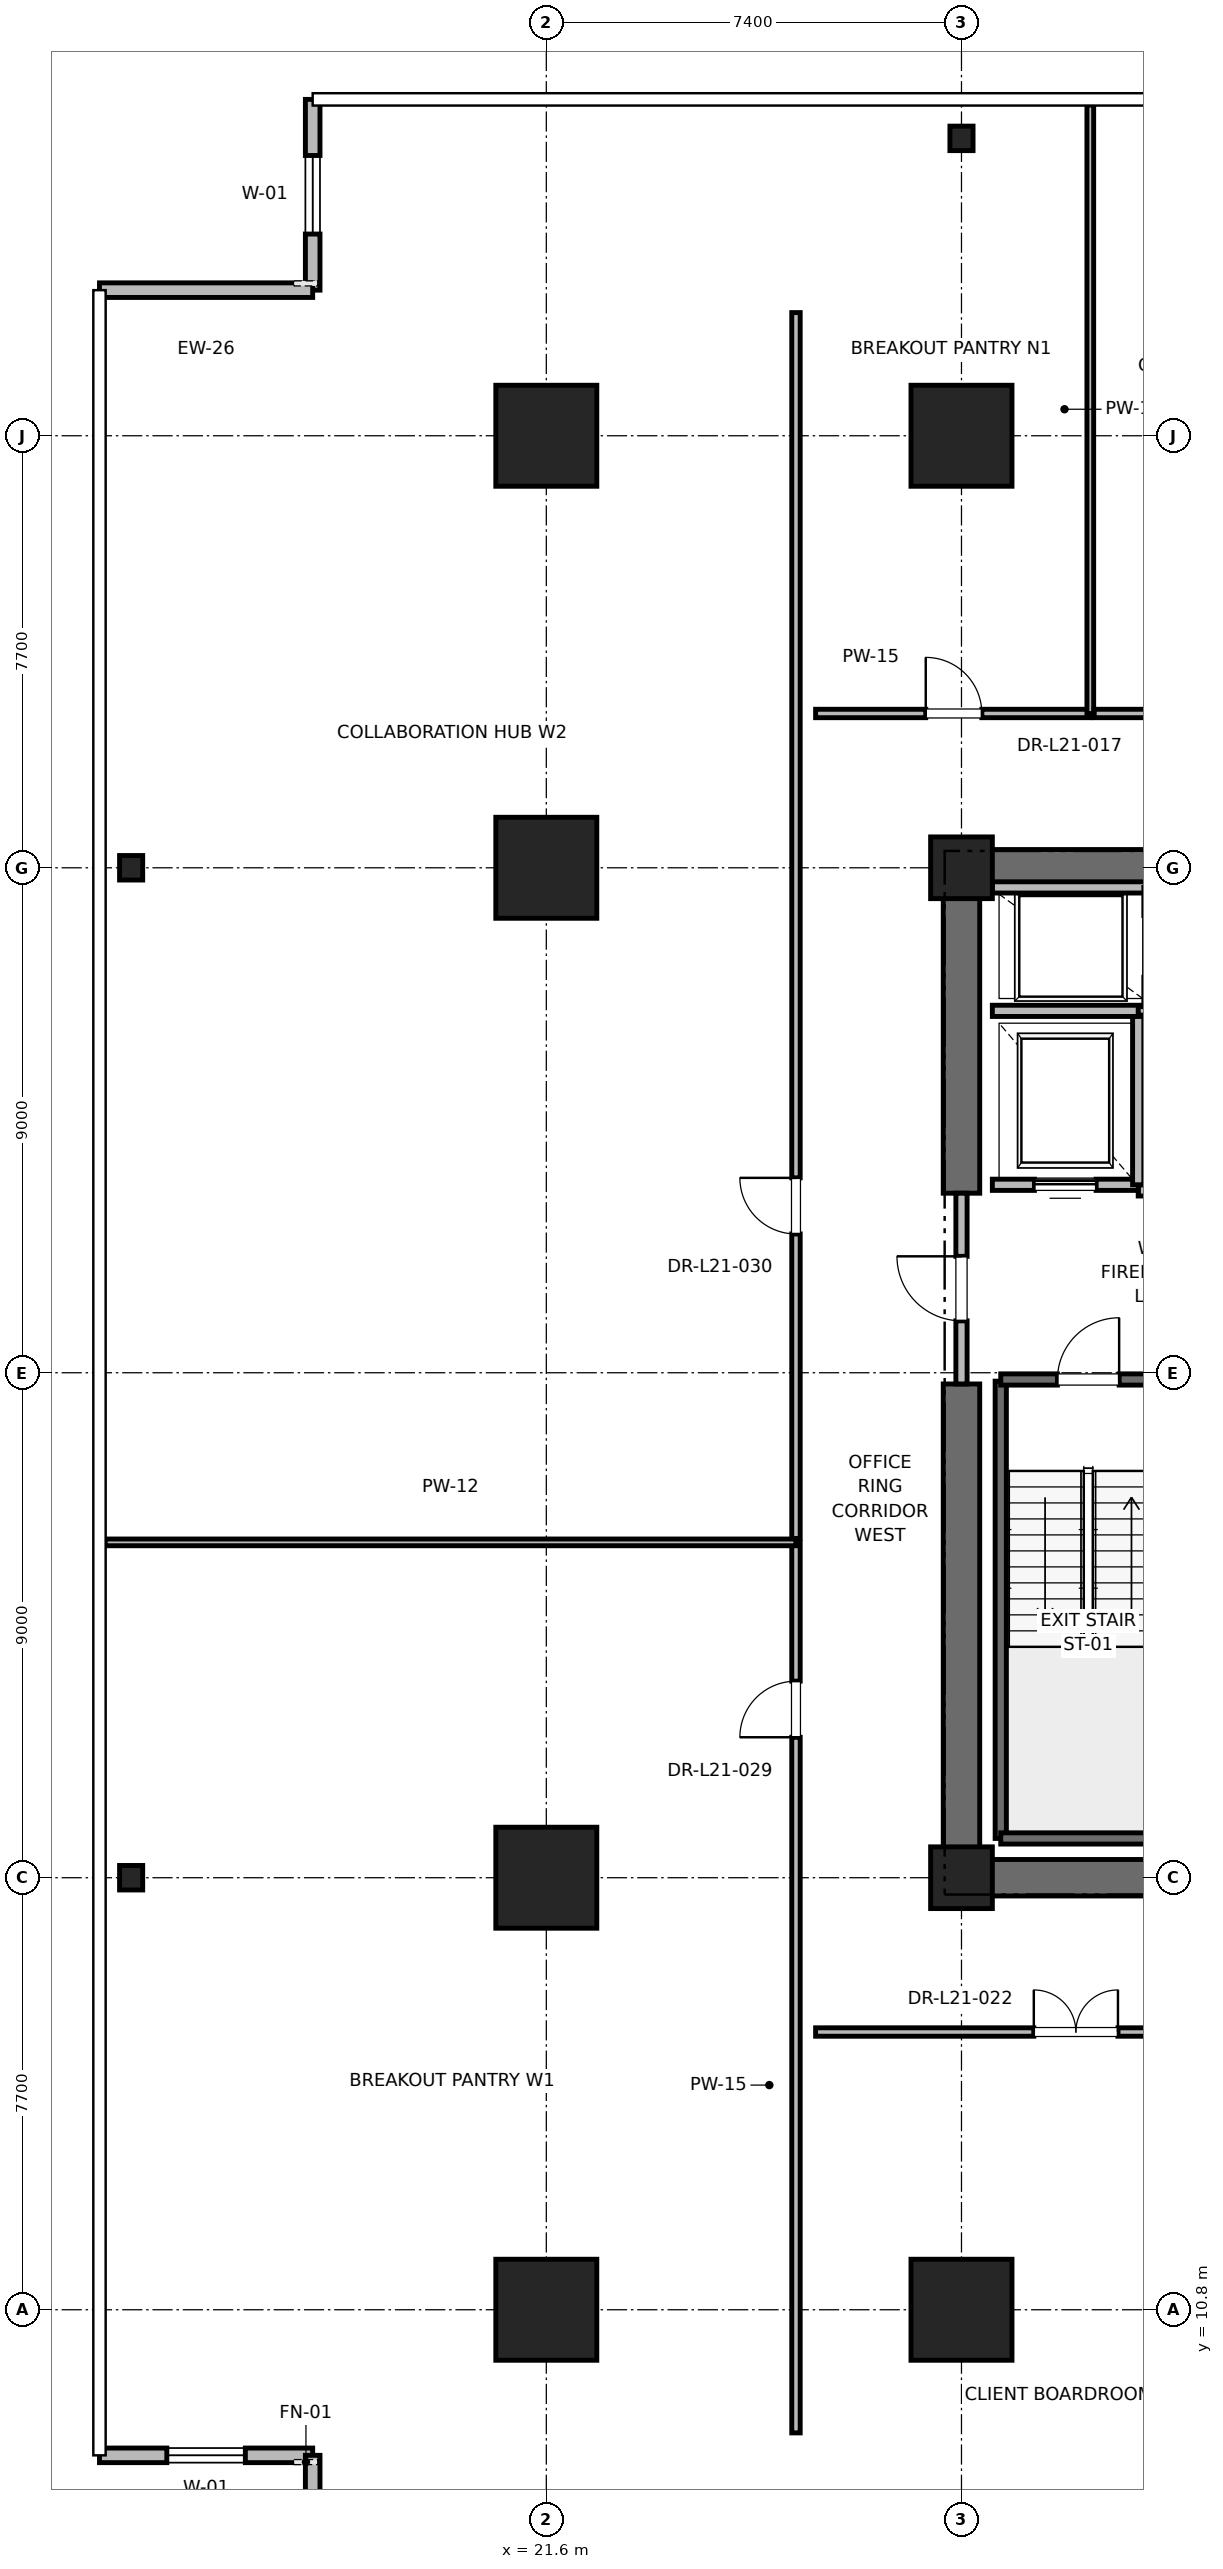
"""IFC4 building model, lengths in metres.
Left out: names, types, materials, properties, quantities, classifications, styles, units other than length and angle.
Written with IfcOpenShell. Run it as: python <this file> out.ifc"""

import sys

from ifc_helpers import new_model, si_unit, direction, frame, frame_2d, origin, origin_2d, place, context, subcontext, project, spatial, rectangle, i_section, extrude, element, fill, save


model = new_model("IFC4")
c1 = context("Model", 3, precision=1e-05, world=origin(), true_north=direction((0.0, 1.0)))
c2 = subcontext(c1, "Body", "Model", "MODEL_VIEW")
j1 = project(units=[si_unit("LENGTHUNIT", "METRE"), si_unit("PLANEANGLEUNIT", "RADIAN")], contexts=[c1])
p1 = place(None, origin())
s1 = spatial("IfcSite", under=j1, at=p1, CompositionType="ELEMENT")
p2 = place(p1, origin())
s2 = spatial("IfcBuilding", under=s1, at=p2, CompositionType="ELEMENT")
p3 = place(p2, frame((0.0, 0.0, 91.6)))
s3 = spatial("IfcBuildingStorey", under=s2, at=p3, CompositionType="ELEMENT", Elevation=91.6)
for number, where, z_axis, x_axis in (
    (1, (29.0, 10.8, 0.0), (0.0, 0.0, 1.0), (1.0, 0.0, 0.0)),
    (2, (29.0, 44.2, 0.0), (0.0, 0.0, 1.0), (1.0, 0.0, 0.0)),
    (3, (21.6, 18.5, 0.0), (0.0, 0.0, 1.0), (1.0, 0.0, 0.0)),
    (4, (21.6, 36.5, 0.0), (0.0, 0.0, 1.0), (1.0, 0.0, 0.0)),
    (5, (21.6, 10.8, 0.0), (0.0, 0.0, 1.0), (1.0, 0.0, 0.0)),
    (6, (21.6, 44.2, 0.0), (0.0, 0.0, 1.0), (1.0, 0.0, 0.0)),
):
    element("IfcColumn", number, at=place(p3, frame(where, z_axis=z_axis, x_axis=x_axis)), inside=s3, PredefinedType="COLUMN", context=c2, shape_type="SweptSolid", body=[
        extrude(rectangle(XDim=1.8, YDim=1.8, at=origin_2d()), origin(), (0.0, 0.0, 1.0), 4.0),
    ])
for number, where, z_axis, x_axis in (
    (7, (14.2, 18.5, 0.0), (0.0, 0.0, 1.0), (1.0, 0.0, 0.0)),
    (8, (14.2, 36.5, 0.0), (0.0, 0.0, 1.0), (1.0, 0.0, 0.0)),
    (9, (29.0, 49.5, 0.0), (0.0, 0.0, 1.0), (1.0, 0.0, 0.0)),
):
    element("IfcColumn", number, at=place(p3, frame(where, z_axis=z_axis, x_axis=x_axis)), inside=s3, PredefinedType="COLUMN", context=c2, shape_type="SweptSolid", body=[
        extrude(i_section(OverallWidth=0.412, OverallDepth=0.437, WebThickness=0.036, FlangeThickness=0.058, FilletRadius=0.015, at=origin_2d()), origin(), (0.0, 0.0, 1.0), 4.0),
    ])
for number, where, z_axis, x_axis in (
    (10, (29.0, 18.5, 0.0), (0.0, 0.0, 1.0), (1.0, 0.0, 0.0)),
    (11, (29.0, 36.5, 0.0), (0.0, 0.0, 1.0), (1.0, 0.0, 0.0)),
):
    element("IfcColumn", number, at=place(p3, frame(where, z_axis=z_axis, x_axis=x_axis)), inside=s3, PredefinedType="PILASTER", context=c2, shape_type="SweptSolid", body=[
        extrude(rectangle(XDim=1.1, YDim=1.1, at=origin_2d()), origin(), (0.0, 0.0, 1.0), 4.0),
    ])
p4 = place(p3, frame((29.0, 18.5, 0.0), z_axis=(0.0, 0.0, 1.0), x_axis=(1.0, 0.0, 0.0)))
e12 = element("IfcWall", 12, at=p4, inside=s3, PredefinedType="SHEAR", context=c2, shape_type="SweptSolid", body=[
    extrude(rectangle(XDim=9.2, YDim=0.65, at=frame_2d((4.6, 0.0))), origin(), (0.0, 0.0, 1.0), 3.76),
])
p5 = place(p3, frame((29.0, 36.5, 0.0), z_axis=(0.0, 0.0, 1.0), x_axis=(1.0, 0.0, 0.0)))
e13 = element("IfcWall", 13, at=p5, inside=s3, PredefinedType="SHEAR", context=c2, shape_type="SweptSolid", body=[
    extrude(rectangle(XDim=5.8, YDim=0.65, at=frame_2d((2.9, 0.0))), origin(), (0.0, 0.0, 1.0), 3.76),
])
p6 = place(p3, frame((29.0, 18.5, 0.0), z_axis=(0.0, 0.0, 1.0), x_axis=(0.0, 1.0, 0.0)))
e14 = element("IfcWall", 14, at=p6, inside=s3, PredefinedType="SHEAR", context=c2, shape_type="SweptSolid", body=[
    extrude(rectangle(XDim=8.8, YDim=0.65, at=frame_2d((4.4, 0.0))), origin(), (0.0, 0.0, 1.0), 3.76),
])
p7 = place(p3, frame((29.0, 30.7, 0.0), z_axis=(0.0, 0.0, 1.0), x_axis=(0.0, 1.0, 0.0)))
e15 = element("IfcWall", 15, at=p7, inside=s3, PredefinedType="SHEAR", context=c2, shape_type="SweptSolid", body=[
    extrude(rectangle(XDim=5.8, YDim=0.65, at=frame_2d((2.9, 0.0))), origin(), (0.0, 0.0, 1.0), 3.76),
])
p8 = place(p3, frame((13.636, 8.205, 0.0), z_axis=(0.0, 0.0, 1.0), x_axis=(1.0, 0.0, 0.0)))
e16 = element("IfcWall", 16, at=p8, inside=s3, PredefinedType="PARAPET", context=c2, shape_type="SweptSolid", body=[
    extrude(rectangle(XDim=3.8, YDim=0.26, at=frame_2d((1.9, 0.0))), origin(), (0.0, 0.0, 1.0), 3.76),
])
p9 = place(p8, frame((1.2, 0.0, 0.85)))
e17 = element("IfcOpeningElement", 17, at=p9, cuts=e16, PredefinedType="OPENING", context=c2, shape_type="SweptSolid", body=[
    extrude(rectangle(XDim=1.4, YDim=2.0, at=frame_2d((0.7, 1.0))), frame((0.0, 0.13, 0.0), z_axis=(0.0, -1.0, 0.0), x_axis=(1.0, 0.0, 0.0)), (0.0, 0.0, 1.0), 0.26),
])
p10 = place(p3, frame((17.436, 8.205, 0.0), z_axis=(0.0, 0.0, 1.0), x_axis=(0.0, -1.0, 0.0)))
e18 = element("IfcWall", 18, at=p10, inside=s3, PredefinedType="PARAPET", context=c2, shape_type="SweptSolid", body=[
    extrude(rectangle(XDim=3.4, YDim=0.26, at=frame_2d((1.7, 0.0))), origin(), (0.0, 0.0, 1.0), 3.76),
])
p11 = place(p3, frame((17.436, 50.195, 0.0), z_axis=(0.0, 0.0, 1.0), x_axis=(0.0, -1.0, 0.0)))
e19 = element("IfcWall", 19, at=p11, inside=s3, PredefinedType="PARAPET", context=c2, shape_type="SweptSolid", body=[
    extrude(rectangle(XDim=3.4, YDim=0.26, at=frame_2d((1.7, 0.0))), origin(), (0.0, 0.0, 1.0), 3.76),
])
p12 = place(p11, frame((1.0, 0.0, 0.85)))
e20 = element("IfcOpeningElement", 20, at=p12, cuts=e19, PredefinedType="OPENING", context=c2, shape_type="SweptSolid", body=[
    extrude(rectangle(XDim=1.4, YDim=2.0, at=frame_2d((0.7, 1.0))), frame((0.0, 0.13, 0.0), z_axis=(0.0, -1.0, 0.0), x_axis=(1.0, 0.0, 0.0)), (0.0, 0.0, 1.0), 0.26),
])
p13 = place(p3, frame((17.436, 46.795, 0.0), z_axis=(0.0, 0.0, 1.0), x_axis=(-1.0, 0.0, 0.0)))
e21 = element("IfcWall", 21, at=p13, inside=s3, PredefinedType="PARAPET", context=c2, shape_type="SweptSolid", body=[
    extrude(rectangle(XDim=3.8, YDim=0.26, at=frame_2d((1.9, 0.0))), origin(), (0.0, 0.0, 1.0), 3.76),
])
p14 = place(p3, frame((29.7, 19.2, 0.0), z_axis=(0.0, 0.0, 1.0), x_axis=(0.0, 1.0, 0.0)))
e22 = element("IfcWall", 22, at=p14, inside=s3, PredefinedType="SOLIDWALL", context=c2, shape_type="SweptSolid", body=[
    extrude(rectangle(XDim=8.15, YDim=0.2, at=frame_2d((4.075, 0.0))), origin(), (0.0, 0.0, 1.0), 3.76),
])
p15 = place(p3, frame((29.7, 19.2, 0.0), z_axis=(0.0, 0.0, 1.0), x_axis=(1.0, 0.0, 0.0)))
e23 = element("IfcWall", 23, at=p15, inside=s3, PredefinedType="SOLIDWALL", context=c2, shape_type="SweptSolid", body=[
    extrude(rectangle(XDim=3.12, YDim=0.2, at=frame_2d((1.56, 0.0))), origin(), (0.0, 0.0, 1.0), 3.76),
])
p16 = place(p3, frame((29.7, 27.38, 0.0), z_axis=(0.0, 0.0, 1.0), x_axis=(1.0, 0.0, 0.0)))
e24 = element("IfcWall", 24, at=p16, inside=s3, PredefinedType="SOLIDWALL", context=c2, shape_type="SweptSolid", body=[
    extrude(rectangle(XDim=3.12, YDim=0.2, at=frame_2d((1.56, 0.0))), origin(), (0.0, 0.0, 1.0), 3.76),
])
p17 = place(p16, frame((1.01, 0.0, 0.0)))
e25 = element("IfcOpeningElement", 25, at=p17, cuts=e24, PredefinedType="OPENING", context=c2, shape_type="SweptSolid", body=[
    extrude(rectangle(XDim=1.1, YDim=2.15, at=frame_2d((0.55, 1.075))), frame((0.0, 0.1, 0.0), z_axis=(0.0, -1.0, 0.0), x_axis=(1.0, 0.0, 0.0)), (0.0, 0.0, 1.0), 0.2),
])
p18 = place(p3, frame((29.0, 27.3, 0.0), z_axis=(0.0, 0.0, 1.0), x_axis=(0.0, 1.0, 0.0)))
e26 = element("IfcWall", 26, at=p18, inside=s3, PredefinedType="PARTITIONING", context=c2, shape_type="SweptSolid", body=[
    extrude(rectangle(XDim=3.4, YDim=0.2, at=frame_2d((1.7, 0.0))), origin(), (0.0, 0.0, 1.0), 2.54),
])
p19 = place(p18, frame((1.125, 0.0, 0.0)))
e27 = element("IfcOpeningElement", 27, at=p19, cuts=e26, PredefinedType="OPENING", context=c2, shape_type="SweptSolid", body=[
    extrude(rectangle(XDim=1.15, YDim=2.2, at=frame_2d((0.575, 1.1))), frame((0.0, 0.1, 0.0), z_axis=(0.0, -1.0, 0.0), x_axis=(1.0, 0.0, 0.0)), (0.0, 0.0, 1.0), 0.2),
])
p20 = place(p3, frame((32.15, 30.75, 0.0), z_axis=(0.0, 0.0, 1.0), x_axis=(1.0, 0.0, 0.0)))
e28 = element("IfcWall", 28, at=p20, inside=s3, PredefinedType="PARTITIONING", context=c2, shape_type="SweptSolid", body=[
    extrude(rectangle(XDim=3.13, YDim=0.2, at=frame_2d((1.565, 0.0))), origin(), (0.0, 0.0, 1.0), 3.76),
])
p21 = place(p3, frame((29.55, 30.85, 0.0), z_axis=(0.0, 0.0, 1.0), x_axis=(1.0, 0.0, 0.0)))
e29 = element("IfcWall", 29, at=p21, inside=s3, PredefinedType="SOLIDWALL", context=c2, shape_type="SweptSolid", body=[
    extrude(rectangle(XDim=2.6, YDim=0.2, at=frame_2d((1.3, 0.0))), origin(), (0.0, 0.0, 1.0), 2.54),
])
p22 = place(p21, frame((0.75, 0.0, 0.0)))
e30 = element("IfcOpeningElement", 30, at=p22, cuts=e29, PredefinedType="OPENING", context=c2, shape_type="SweptSolid", body=[
    extrude(rectangle(XDim=1.1, YDim=2.2, at=frame_2d((0.55, 1.1))), frame((0.0, 0.1, 0.0), z_axis=(0.0, -1.0, 0.0), x_axis=(1.0, 0.0, 0.0)), (0.0, 0.0, 1.0), 0.2),
])
p23 = place(p3, frame((29.55, 33.95, 0.0), z_axis=(0.0, 0.0, 1.0), x_axis=(1.0, 0.0, 0.0)))
e31 = element("IfcWall", 31, at=p23, inside=s3, PredefinedType="SOLIDWALL", context=c2, shape_type="SweptSolid", body=[
    extrude(rectangle(XDim=2.8, YDim=0.2, at=frame_2d((1.4, 0.0))), origin(), (0.0, 0.0, 1.0), 3.76),
])
p24 = place(p3, frame((32.15, 30.85, 0.0), z_axis=(0.0, 0.0, 1.0), x_axis=(0.0, 1.0, 0.0)))
e32 = element("IfcWall", 32, at=p24, inside=s3, PredefinedType="SOLIDWALL", context=c2, shape_type="SweptSolid", body=[
    extrude(rectangle(XDim=3.0, YDim=0.2, at=frame_2d((1.5, 0.0))), origin(), (0.0, 0.0, 1.0), 3.76),
])
p25 = place(p3, frame((32.35, 36.15, 0.0), z_axis=(0.0, 0.0, 1.0), x_axis=(-1.0, 0.0, 0.0)))
e33 = element("IfcWall", 33, at=p25, inside=s3, PredefinedType="SOLIDWALL", context=c2, shape_type="SweptSolid", body=[
    extrude(rectangle(XDim=2.8, YDim=0.2, at=frame_2d((1.4, 0.0))), origin(), (0.0, 0.0, 1.0), 2.889),
])
p26 = place(p3, frame((32.15, 33.95, 0.0), z_axis=(0.0, 0.0, 1.0), x_axis=(1.0, 0.0, 0.0)))
e34 = element("IfcWall", 34, at=p26, inside=s3, PredefinedType="PARTITIONING", context=c2, shape_type="SweptSolid", body=[
    extrude(rectangle(XDim=3.13, YDim=0.15, at=frame_2d((1.565, 0.0))), origin(), (0.0, 0.0, 1.0), 2.85),
])
p27 = place(p3, frame((26.4, 39.25, 0.0), z_axis=(0.0, 0.0, 1.0), x_axis=(1.0, 0.0, 0.0)))
e35 = element("IfcWall", 35, at=p27, inside=s3, PredefinedType="PARTITIONING", context=c2, shape_type="SweptSolid", body=[
    extrude(rectangle(XDim=4.896, YDim=0.15, at=frame_2d((2.448, 0.0))), origin(), (0.0, 0.0, 1.0), 2.85),
])
p28 = place(p27, frame((1.963, 0.0, 0.0)))
e36 = element("IfcOpeningElement", 36, at=p28, cuts=e35, PredefinedType="OPENING", context=c2, shape_type="SweptSolid", body=[
    extrude(rectangle(XDim=1.0, YDim=2.15, at=frame_2d((0.5, 1.075))), frame((0.0, 0.075, 0.0), z_axis=(0.0, -1.0, 0.0), x_axis=(1.0, 0.0, 0.0)), (0.0, 0.0, 1.0), 0.15),
])
p29 = place(p3, frame((31.296, 39.25, 0.0), z_axis=(0.0, 0.0, 1.0), x_axis=(0.0, 1.0, 0.0)))
e37 = element("IfcWall", 37, at=p29, inside=s3, PredefinedType="PARTITIONING", context=c2, shape_type="SweptSolid", body=[
    extrude(rectangle(XDim=10.845, YDim=0.12, at=frame_2d((5.422, 0.0))), origin(), (0.0, 0.0, 1.0), 2.39),
])
p30 = place(p3, frame((31.366, 39.25, 0.0), z_axis=(0.0, 0.0, 1.0), x_axis=(1.0, 0.0, 0.0)))
e38 = element("IfcWall", 38, at=p30, inside=s3, PredefinedType="PARTITIONING", context=c2, shape_type="SweptSolid", body=[
    extrude(rectangle(XDim=5.642, YDim=0.15, at=frame_2d((2.821, 0.0))), origin(), (0.0, 0.0, 1.0), 2.85),
])
p31 = place(p30, frame((2.286, 0.0, 0.0)))
e39 = element("IfcOpeningElement", 39, at=p31, cuts=e38, PredefinedType="OPENING", context=c2, shape_type="SweptSolid", body=[
    extrude(rectangle(XDim=1.0, YDim=2.15, at=frame_2d((0.5, 1.075))), frame((0.0, 0.075, 0.0), z_axis=(0.0, -1.0, 0.0), x_axis=(1.0, 0.0, 0.0)), (0.0, 0.0, 1.0), 0.15),
])
p32 = place(p3, frame((26.4, 15.75, 0.0), z_axis=(0.0, 0.0, 1.0), x_axis=(1.0, 0.0, 0.0)))
e40 = element("IfcWall", 40, at=p32, inside=s3, PredefinedType="PARTITIONING", context=c2, shape_type="SweptSolid", body=[
    extrude(rectangle(XDim=9.248, YDim=0.15, at=frame_2d((4.624, 0.0))), origin(), (0.0, 0.0, 1.0), 2.85),
])
p33 = place(p32, frame((3.889, 0.0, 0.0)))
e41 = element("IfcOpeningElement", 41, at=p33, cuts=e40, PredefinedType="OPENING", context=c2, shape_type="SweptSolid", body=[
    extrude(rectangle(XDim=1.5, YDim=2.25, at=frame_2d((0.75, 1.125))), frame((0.0, 0.075, 0.0), z_axis=(0.0, -1.0, 0.0), x_axis=(1.0, 0.0, 0.0)), (0.0, 0.0, 1.0), 0.15),
])
p34 = place(p3, frame((26.05, 8.605, 0.0), z_axis=(0.0, 0.0, 1.0), x_axis=(0.0, 1.0, 0.0)))
e42 = element("IfcWall", 42, at=p34, inside=s3, PredefinedType="PARTITIONING", context=c2, shape_type="SweptSolid", body=[
    extrude(rectangle(XDim=15.872, YDim=0.15, at=frame_2d((7.936, 0.0))), origin(), (0.0, 0.0, 1.0), 2.85),
])
p35 = place(p34, frame((12.398, 0.0, 0.0)))
e43 = element("IfcOpeningElement", 43, at=p35, cuts=e42, PredefinedType="OPENING", context=c2, shape_type="SweptSolid", body=[
    extrude(rectangle(XDim=1.0, YDim=2.15, at=frame_2d((0.5, 1.075))), frame((0.0, 0.075, 0.0), z_axis=(0.0, -1.0, 0.0), x_axis=(1.0, 0.0, 0.0)), (0.0, 0.0, 1.0), 0.15),
])
p36 = place(p3, frame((13.736, 24.477, 0.0), z_axis=(0.0, 0.0, 1.0), x_axis=(1.0, 0.0, 0.0)))
e44 = element("IfcWall", 44, at=p36, inside=s3, PredefinedType="PARTITIONING", context=c2, shape_type="SweptSolid", body=[
    extrude(rectangle(XDim=12.314, YDim=0.12, at=frame_2d((6.157, 0.0))), origin(), (0.0, 0.0, 1.0), 2.85),
])
p37 = place(p3, frame((26.05, 24.547, 0.0), z_axis=(0.0, 0.0, 1.0), x_axis=(0.0, 1.0, 0.0)))
e45 = element("IfcWall", 45, at=p37, inside=s3, PredefinedType="PARTITIONING", context=c2, shape_type="SweptSolid", body=[
    extrude(rectangle(XDim=21.848, YDim=0.15, at=frame_2d((10.924, 0.0))), origin(), (0.0, 0.0, 1.0), 2.85),
])
p38 = place(p37, frame((5.427, 0.0, 0.0)))
e46 = element("IfcOpeningElement", 46, at=p38, cuts=e45, PredefinedType="OPENING", context=c2, shape_type="SweptSolid", body=[
    extrude(rectangle(XDim=1.0, YDim=2.15, at=frame_2d((0.5, 1.075))), frame((0.0, 0.075, 0.0), z_axis=(0.0, -1.0, 0.0), x_axis=(1.0, 0.0, 0.0)), (0.0, 0.0, 1.0), 0.15),
])
p39 = place(p9, origin())
e47 = element("IfcWindow", 47, at=p39, inside=s3, PartitioningType="SINGLE_PANEL", PredefinedType="WINDOW", context=c2, shape_type="SweptSolid", body=[
    extrude(rectangle(XDim=1.4, YDim=2.0, at=frame_2d((0.7, 1.0))), frame((0.0, 0.03, 0.0), z_axis=(0.0, -1.0, 0.0), x_axis=(1.0, 0.0, 0.0)), (0.0, 0.0, 1.0), 0.06),
])
fill(e17, e47)
p40 = place(p12, origin())
e48 = element("IfcWindow", 48, at=p40, inside=s3, PartitioningType="SINGLE_PANEL", PredefinedType="WINDOW", context=c2, shape_type="SweptSolid", body=[
    extrude(rectangle(XDim=1.4, YDim=2.0, at=frame_2d((0.7, 1.0))), frame((0.0, 0.03, 0.0), z_axis=(0.0, -1.0, 0.0), x_axis=(1.0, 0.0, 0.0)), (0.0, 0.0, 1.0), 0.06),
])
fill(e20, e48)
p41 = place(p17, origin())
e49 = element("IfcDoor", 49, at=p41, inside=s3, OperationType="SINGLE_SWING_RIGHT", PredefinedType="DOOR", context=c2, shape_type="SweptSolid", body=[
    extrude(rectangle(XDim=1.1, YDim=2.15, at=frame_2d((0.55, 1.075))), frame((0.0, 0.025, 0.0), z_axis=(0.0, -1.0, 0.0), x_axis=(1.0, 0.0, 0.0)), (0.0, 0.0, 1.0), 0.05),
])
fill(e25, e49)
p42 = place(p19, origin())
e50 = element("IfcDoor", 50, at=p42, inside=s3, OperationType="SINGLE_SWING_RIGHT", PredefinedType="DOOR", context=c2, shape_type="SweptSolid", body=[
    extrude(rectangle(XDim=1.15, YDim=2.2, at=frame_2d((0.575, 1.1))), frame((0.0, 0.025, 0.0), z_axis=(0.0, -1.0, 0.0), x_axis=(1.0, 0.0, 0.0)), (0.0, 0.0, 1.0), 0.05),
])
fill(e27, e50)
p43 = place(p22, origin())
e51 = element("IfcDoor", 51, at=p43, inside=s3, OperationType="SLIDING_TO_RIGHT", PredefinedType="DOOR", context=c2, shape_type="SweptSolid", body=[
    extrude(rectangle(XDim=1.1, YDim=2.2, at=frame_2d((0.55, 1.1))), frame((0.0, 0.025, 0.0), z_axis=(0.0, -1.0, 0.0), x_axis=(1.0, 0.0, 0.0)), (0.0, 0.0, 1.0), 0.05),
])
fill(e30, e51)
p44 = place(p28, origin())
e52 = element("IfcDoor", 52, at=p44, inside=s3, OperationType="SINGLE_SWING_LEFT", PredefinedType="DOOR", context=c2, shape_type="SweptSolid", body=[
    extrude(rectangle(XDim=1.0, YDim=2.15, at=frame_2d((0.5, 1.075))), frame((0.0, 0.025, 0.0), z_axis=(0.0, -1.0, 0.0), x_axis=(1.0, 0.0, 0.0)), (0.0, 0.0, 1.0), 0.05),
])
fill(e36, e52)
p45 = place(p33, origin())
e53 = element("IfcDoor", 53, at=p45, inside=s3, OperationType="DOUBLE_DOOR_SINGLE_SWING", PredefinedType="DOOR", context=c2, shape_type="SweptSolid", body=[
    extrude(rectangle(XDim=1.5, YDim=2.25, at=frame_2d((0.75, 1.125))), frame((0.0, 0.025, 0.0), z_axis=(0.0, -1.0, 0.0), x_axis=(1.0, 0.0, 0.0)), (0.0, 0.0, 1.0), 0.05),
])
fill(e41, e53)
p46 = place(p35, origin())
e54 = element("IfcDoor", 54, at=p46, inside=s3, OperationType="SINGLE_SWING_LEFT", PredefinedType="DOOR", context=c2, shape_type="SweptSolid", body=[
    extrude(rectangle(XDim=1.0, YDim=2.15, at=frame_2d((0.5, 1.075))), frame((0.0, 0.025, 0.0), z_axis=(0.0, -1.0, 0.0), x_axis=(1.0, 0.0, 0.0)), (0.0, 0.0, 1.0), 0.05),
])
fill(e43, e54)
p47 = place(p38, origin())
e55 = element("IfcDoor", 55, at=p47, inside=s3, OperationType="SINGLE_SWING_RIGHT", PredefinedType="DOOR", context=c2, shape_type="SweptSolid", body=[
    extrude(rectangle(XDim=1.0, YDim=2.15, at=frame_2d((0.5, 1.075))), frame((0.0, 0.025, 0.0), z_axis=(0.0, -1.0, 0.0), x_axis=(1.0, 0.0, 0.0)), (0.0, 0.0, 1.0), 0.05),
])
fill(e46, e55)
save(model, sys.argv[1])
